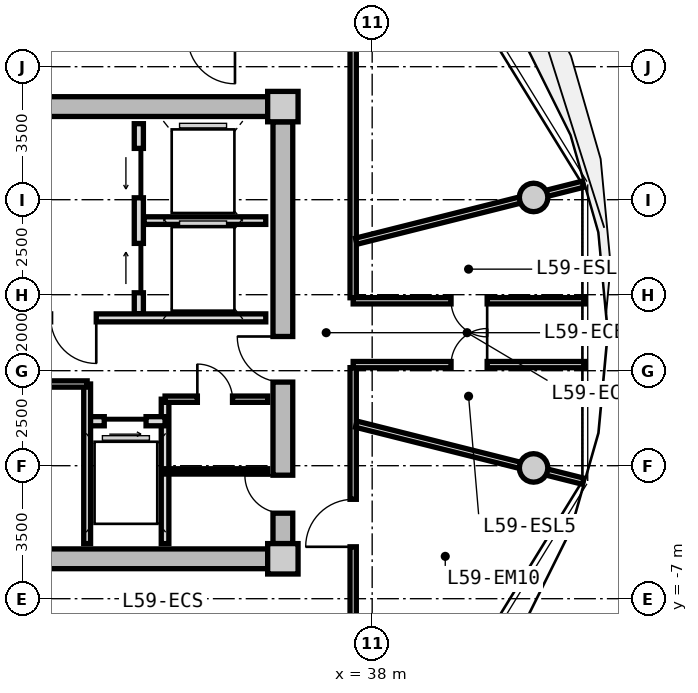
"""IFC4 building model, lengths in metres.
Left out: names, types, materials, properties, quantities, classifications, styles, units other than length and angle.
Written with IfcOpenShell. Run it as: python <this file> out.ifc"""

import sys

from ifc_helpers import new_model, si_unit, direction, frame, frame_2d, origin, origin_2d, place, context, subcontext, project, spatial, rectangle, circle, extrude, source, transform, mapped, element, fill, save


model = new_model("IFC4")
c1 = context("Model", 3, precision=1e-05, world=origin(), true_north=direction((0.0, 1.0)))
c2 = subcontext(c1, "Body", "Model", "MODEL_VIEW")
j1 = project(units=[si_unit("LENGTHUNIT", "METRE"), si_unit("PLANEANGLEUNIT", "RADIAN")], contexts=[c1])
p1 = place(None, origin())
s1 = spatial("IfcSite", under=j1, at=p1, CompositionType="ELEMENT")
p2 = place(p1, origin())
s2 = spatial("IfcBuilding", under=s1, at=p2, CompositionType="ELEMENT")
p3 = place(p2, frame((0.0, 0.0, 190.65)))
s3 = spatial("IfcBuildingStorey", under=s2, at=p3, CompositionType="ELEMENT", Elevation=190.65)
m1 = source(origin(), c2, "Body", "SweptSolid", [
    extrude(rectangle(XDim=0.8, YDim=0.8, at=origin_2d()), origin(), (0.0, 0.0, 1.0), 3.05),
])
for number, where, z_axis, x_axis in (
    (1, (35.65, -5.95, 0.0), (0.0, 0.0, 1.0), (1.0, 0.0, 0.0)),
    (2, (35.65, 5.95, 0.0), (0.0, 0.0, 1.0), (1.0, 0.0, 0.0)),
):
    element("IfcColumn", number, at=place(p3, frame(where, z_axis=z_axis, x_axis=x_axis)), inside=s3, PredefinedType="COLUMN", context=c2, shape_type="MappedRepresentation", body=[
        mapped(m1, transform((0.0, 0.0, 0.0), x_axis=(1.0, 0.0, 0.0), y_axis=(0.0, 1.0, 0.0), z_axis=(0.0, 0.0, 1.0), scale=1.0)),
    ])
m2 = source(origin(), c2, "Body", "SweptSolid", [
    extrude(rectangle(XDim=14.5, YDim=0.52, at=frame_2d((7.25, 0.0))), origin(), (0.0, 0.0, 1.0), 2.81),
])
for number, where, z_axis, x_axis in (
    (3, (20.75, 5.95, 0.0), (0.0, 0.0, 1.0), (1.0, 0.0, 0.0)),
    (4, (35.25, -5.95, 0.0), (0.0, 0.0, 1.0), (-1.0, 0.0, 0.0)),
):
    element("IfcWall", number, at=place(p3, frame(where, z_axis=z_axis, x_axis=x_axis)), inside=s3, PredefinedType="SHEAR", context=c2, shape_type="MappedRepresentation", body=[
        mapped(m2, transform((0.0, 0.0, 0.0), x_axis=(1.0, 0.0, 0.0), y_axis=(0.0, 1.0, 0.0), z_axis=(0.0, 0.0, 1.0), scale=1.0)),
    ])
m3 = source(origin(), c2, "Body", "SweptSolid", [
    extrude(rectangle(XDim=11.1, YDim=0.52, at=frame_2d((5.55, 0.0))), origin(), (0.0, 0.0, 1.0), 2.81),
])
p4 = place(p3, frame((35.65, 5.55, 0.0), z_axis=(0.0, 0.0, 1.0), x_axis=(0.0, -1.0, 0.0)))
e5 = element("IfcWall", 5, at=p4, inside=s3, PredefinedType="SHEAR", context=c2, shape_type="MappedRepresentation", body=[
    mapped(m3, transform((0.0, 0.0, 0.0), x_axis=(1.0, 0.0, 0.0), y_axis=(0.0, 1.0, 0.0), z_axis=(0.0, 0.0, 1.0), scale=1.0)),
])
p5 = place(p4, frame((5.65, 0.0, 0.0)))
e6 = element("IfcOpeningElement", 6, at=p5, cuts=e5, PredefinedType="OPENING", context=c2, shape_type="SweptSolid", body=[
    extrude(rectangle(XDim=1.2, YDim=2.15, at=frame_2d((0.6, 1.075))), frame((0.0, 0.27, 0.0), z_axis=(0.0, -1.0, 0.0), x_axis=(1.0, 0.0, 0.0)), (0.0, 0.0, 1.0), 0.54),
])
p6 = place(p4, frame((9.3, 0.0, 0.0)))
e7 = element("IfcOpeningElement", 7, at=p6, cuts=e5, PredefinedType="OPENING", context=c2, shape_type="SweptSolid", body=[
    extrude(rectangle(XDim=1.0, YDim=2.1, at=frame_2d((0.5, 1.05))), frame((0.0, 0.27, 0.0), z_axis=(0.0, -1.0, 0.0), x_axis=(1.0, 0.0, 0.0)), (0.0, 0.0, 1.0), 0.54),
])
m4 = source(origin(), c2, "Body", "SweptSolid", [
    extrude(circle(Radius=0.375, at=origin_2d()), origin(), (0.0, 0.0, 1.0), 3.47),
])
for number, where, z_axis, x_axis in (
    (8, (42.247, 3.559, -0.42), (0.0, 0.0, 1.0), (1.0, 0.0, 0.0)),
    (9, (42.247, -3.559, -0.42), (0.0, 0.0, 1.0), (1.0, 0.0, 0.0)),
):
    element("IfcColumn", number, at=place(p3, frame(where, z_axis=z_axis, x_axis=x_axis)), inside=s3, PredefinedType="COLUMN", context=c2, shape_type="MappedRepresentation", body=[
        mapped(m4, transform((0.0, 0.0, 0.0), x_axis=(1.0, 0.0, 0.0), y_axis=(0.0, 1.0, 0.0), z_axis=(0.0, 0.0, 1.0), scale=1.0)),
    ])
m5 = source(origin(), c2, "Body", "SweptSolid", [
    extrude(rectangle(XDim=5.0, YDim=0.24, at=frame_2d((2.5, 0.0))), origin(), (0.0, 0.0, 1.0), 2.795),
])
p7 = place(p3, frame((31.86, 0.5, 0.0), z_axis=(0.0, 0.0, 1.0), x_axis=(0.0, 1.0, 0.0)))
e10 = element("IfcWall", 10, at=p7, inside=s3, PredefinedType="PARTITIONING", context=c2, shape_type="MappedRepresentation", body=[
    mapped(m5, transform((0.0, 0.0, 0.0), x_axis=(1.0, 0.0, 0.0), y_axis=(0.0, 1.0, 0.0), z_axis=(0.0, 0.0, 1.0), scale=1.0)),
])
p8 = place(p7, frame((3.05, 0.0, 0.0)))
e11 = element("IfcOpeningElement", 11, at=p8, cuts=e10, PredefinedType="OPENING", context=c2, shape_type="SweptSolid", body=[
    extrude(rectangle(XDim=1.3, YDim=2.2, at=frame_2d((0.65, 1.1))), frame((0.0, 0.13, 0.0), z_axis=(0.0, -1.0, 0.0), x_axis=(1.0, 0.0, 0.0)), (0.0, 0.0, 1.0), 0.26),
])
p9 = place(p7, frame((0.55, 0.0, 0.0)))
e12 = element("IfcOpeningElement", 12, at=p9, cuts=e10, PredefinedType="OPENING", context=c2, shape_type="SweptSolid", body=[
    extrude(rectangle(XDim=1.3, YDim=2.2, at=frame_2d((0.65, 1.1))), frame((0.0, 0.13, 0.0), z_axis=(0.0, -1.0, 0.0), x_axis=(1.0, 0.0, 0.0)), (0.0, 0.0, 1.0), 0.26),
])
m6 = source(origin(), c2, "Body", "SweptSolid", [
    extrude(rectangle(XDim=3.2, YDim=0.2, at=frame_2d((1.6, 0.0))), origin(), (0.0, 0.0, 1.0), 2.795),
])
p10 = place(p3, frame((32.0, 2.95, 0.0), z_axis=(0.0, 0.0, 1.0), x_axis=(1.0, 0.0, 0.0)))
e13 = element("IfcWall", 13, at=p10, inside=s3, PredefinedType="PARTITIONING", context=c2, shape_type="MappedRepresentation", body=[
    mapped(m6, transform((0.0, 0.0, 0.0), x_axis=(1.0, 0.0, 0.0), y_axis=(0.0, 1.0, 0.0), z_axis=(0.0, 0.0, 1.0), scale=1.0)),
])
m7 = source(origin(), c2, "Body", "SweptSolid", [
    extrude(rectangle(XDim=6.66, YDim=0.21, at=frame_2d((3.33, 0.0))), origin(), (0.0, 0.0, 1.0), 2.795),
])
p11 = place(p3, frame((28.54, 0.39, 0.0), z_axis=(0.0, 0.0, 1.0), x_axis=(1.0, 0.0, 0.0)))
e14 = element("IfcWall", 14, at=p11, inside=s3, PredefinedType="PARTITIONING", context=c2, shape_type="MappedRepresentation", body=[
    mapped(m7, transform((0.0, 0.0, 0.0), x_axis=(1.0, 0.0, 0.0), y_axis=(0.0, 1.0, 0.0), z_axis=(0.0, 0.0, 1.0), scale=1.0)),
])
p12 = place(p11, frame((1.0, 0.0, 0.0)))
e15 = element("IfcOpeningElement", 15, at=p12, cuts=e14, PredefinedType="OPENING", context=c2, shape_type="SweptSolid", body=[
    extrude(rectangle(XDim=1.2, YDim=2.15, at=frame_2d((0.6, 1.075))), frame((0.0, 0.115, 0.0), z_axis=(0.0, -1.0, 0.0), x_axis=(1.0, 0.0, 0.0)), (0.0, 0.0, 1.0), 0.23),
])
m8 = source(origin(), c2, "Body", "SweptSolid", [
    extrude(rectangle(XDim=3.8, YDim=0.2, at=frame_2d((1.9, 0.0))), origin(), (0.0, 0.0, 1.0), 2.795),
])
p13 = place(p3, frame((32.55, -5.55, 0.0), z_axis=(0.0, 0.0, 1.0), x_axis=(0.0, 1.0, 0.0)))
e16 = element("IfcWall", 16, at=p13, inside=s3, PredefinedType="PARTITIONING", context=c2, shape_type="MappedRepresentation", body=[
    mapped(m8, transform((0.0, 0.0, 0.0), x_axis=(1.0, 0.0, 0.0), y_axis=(0.0, 1.0, 0.0), z_axis=(0.0, 0.0, 1.0), scale=1.0)),
])
m9 = source(origin(), c2, "Body", "SweptSolid", [
    extrude(rectangle(XDim=2.05, YDim=0.24, at=frame_2d((1.025, 0.0))), origin(), (0.0, 0.0, 1.0), 2.795),
])
p14 = place(p3, frame((30.5, -2.33, 0.0), z_axis=(0.0, 0.0, 1.0), x_axis=(1.0, 0.0, 0.0)))
e17 = element("IfcWall", 17, at=p14, inside=s3, PredefinedType="PARTITIONING", context=c2, shape_type="MappedRepresentation", body=[
    mapped(m9, transform((0.0, 0.0, 0.0), x_axis=(1.0, 0.0, 0.0), y_axis=(0.0, 1.0, 0.0), z_axis=(0.0, 0.0, 1.0), scale=1.0)),
])
p15 = place(p14, frame((0.45, 0.0, 0.0)))
e18 = element("IfcOpeningElement", 18, at=p15, cuts=e17, PredefinedType="OPENING", context=c2, shape_type="SweptSolid", body=[
    extrude(rectangle(XDim=1.1, YDim=2.2, at=frame_2d((0.55, 1.1))), frame((0.0, 0.13, 0.0), z_axis=(0.0, -1.0, 0.0), x_axis=(1.0, 0.0, 0.0)), (0.0, 0.0, 1.0), 0.26),
])
m10 = source(origin(), c2, "Body", "SweptSolid", [
    extrude(rectangle(XDim=4.2, YDim=0.18, at=frame_2d((2.1, 0.0))), origin(), (0.0, 0.0, 1.0), 2.795),
])
p16 = place(p3, frame((30.5, -5.55, 0.0), z_axis=(0.0, 0.0, 1.0), x_axis=(0.0, 1.0, 0.0)))
e19 = element("IfcWall", 19, at=p16, inside=s3, PredefinedType="PARTITIONING", context=c2, shape_type="MappedRepresentation", body=[
    mapped(m10, transform((0.0, 0.0, 0.0), x_axis=(1.0, 0.0, 0.0), y_axis=(0.0, 1.0, 0.0), z_axis=(0.0, 0.0, 1.0), scale=1.0)),
])
m11 = source(origin(), c2, "Body", "SweptSolid", [
    extrude(rectangle(XDim=4.77, YDim=0.165, at=frame_2d((2.385, 0.0))), origin(), (0.0, 0.0, 1.0), 2.795),
])
p17 = place(p3, frame((25.73, -1.35, 0.0), z_axis=(0.0, 0.0, 1.0), x_axis=(1.0, 0.0, 0.0)))
e20 = element("IfcWall", 20, at=p17, inside=s3, PredefinedType="PARTITIONING", context=c2, shape_type="MappedRepresentation", body=[
    mapped(m11, transform((0.0, 0.0, 0.0), x_axis=(1.0, 0.0, 0.0), y_axis=(0.0, 1.0, 0.0), z_axis=(0.0, 0.0, 1.0), scale=1.0)),
])
p18 = place(p17, frame((1.85, 0.0, 0.0)))
e21 = element("IfcOpeningElement", 21, at=p18, cuts=e20, PredefinedType="OPENING", context=c2, shape_type="SweptSolid", body=[
    extrude(rectangle(XDim=1.0, YDim=2.1, at=frame_2d((0.5, 1.05))), frame((0.0, 0.093, 0.0), z_axis=(0.0, -1.0, 0.0), x_axis=(1.0, 0.0, 0.0)), (0.0, 0.0, 1.0), 0.185),
])
m12 = source(origin(), c2, "Body", "SweptSolid", [
    extrude(rectangle(XDim=2.7, YDim=0.165, at=frame_2d((1.35, 0.0))), origin(), (0.0, 0.0, 1.0), 2.795),
])
p19 = place(p3, frame((32.55, -1.75, 0.0), z_axis=(0.0, 0.0, 1.0), x_axis=(1.0, 0.0, 0.0)))
e22 = element("IfcWall", 22, at=p19, inside=s3, PredefinedType="PARTITIONING", context=c2, shape_type="MappedRepresentation", body=[
    mapped(m12, transform((0.0, 0.0, 0.0), x_axis=(1.0, 0.0, 0.0), y_axis=(0.0, 1.0, 0.0), z_axis=(0.0, 0.0, 1.0), scale=1.0)),
])
p20 = place(p19, frame((0.85, 0.0, 0.0)))
e23 = element("IfcOpeningElement", 23, at=p20, cuts=e22, PredefinedType="OPENING", context=c2, shape_type="SweptSolid", body=[
    extrude(rectangle(XDim=0.925, YDim=2.1, at=frame_2d((0.462, 1.05))), frame((0.0, 0.093, 0.0), z_axis=(0.0, -1.0, 0.0), x_axis=(1.0, 0.0, 0.0)), (0.0, 0.0, 1.0), 0.185),
])
m13 = source(origin(), c2, "Body", "SweptSolid", [
    extrude(rectangle(XDim=2.7, YDim=0.14, at=frame_2d((1.35, 0.0))), origin(), (0.0, 0.0, 1.0), 2.795),
])
p21 = place(p3, frame((32.55, -3.65, 0.0), z_axis=(0.0, 0.0, 1.0), x_axis=(1.0, 0.0, 0.0)))
e24 = element("IfcWall", 24, at=p21, inside=s3, PredefinedType="PARTITIONING", context=c2, shape_type="MappedRepresentation", body=[
    mapped(m13, transform((0.0, 0.0, 0.0), x_axis=(1.0, 0.0, 0.0), y_axis=(0.0, 1.0, 0.0), z_axis=(0.0, 0.0, 1.0), scale=1.0)),
])
m14 = source(origin(), c2, "Body", "SweptSolid", [
    extrude(rectangle(XDim=6.88, YDim=0.165, at=frame_2d((3.44, 0.0))), origin(), (0.0, 0.0, 1.0), 2.795),
])
p22 = place(p3, frame((37.5, 7.8, 0.0), z_axis=(0.0, 0.0, 1.0), x_axis=(0.0, -1.0, 0.0)))
e25 = element("IfcWall", 25, at=p22, inside=s3, PredefinedType="PARTITIONING", context=c2, shape_type="MappedRepresentation", body=[
    mapped(m14, transform((0.0, 0.0, 0.0), x_axis=(1.0, 0.0, 0.0), y_axis=(0.0, 1.0, 0.0), z_axis=(0.0, 0.0, 1.0), scale=1.0)),
])
p23 = place(p3, frame((37.5, -0.92, 0.0), z_axis=(0.0, 0.0, 1.0), x_axis=(0.0, -1.0, 0.0)))
e26 = element("IfcWall", 26, at=p23, inside=s3, PredefinedType="PARTITIONING", context=c2, shape_type="MappedRepresentation", body=[
    mapped(m14, transform((0.0, 0.0, 0.0), x_axis=(1.0, 0.0, 0.0), y_axis=(0.0, 1.0, 0.0), z_axis=(0.0, 0.0, 1.0), scale=1.0)),
])
p24 = place(p23, frame((3.464, 0.0, 0.0)))
e27 = element("IfcOpeningElement", 27, at=p24, cuts=e26, PredefinedType="OPENING", context=c2, shape_type="SweptSolid", body=[
    extrude(rectangle(XDim=1.25, YDim=2.2, at=frame_2d((0.625, 1.1))), frame((0.0, 0.093, 0.0), z_axis=(0.0, -1.0, 0.0), x_axis=(1.0, 0.0, 0.0)), (0.0, 0.0, 1.0), 0.185),
])
m15 = source(origin(), c2, "Body", "SweptSolid", [
    extrude(rectangle(XDim=6.157, YDim=0.165, at=frame_2d((3.079, 0.0))), origin(), (0.0, 0.0, 1.0), 2.395),
])
for number, where, z_axis, x_axis in (
    (28, (37.58, -2.407, 0.0), (0.0, 0.0, 1.0), (0.97, -0.244, 0.0)),
    (29, (37.58, 2.407, 0.0), (0.0, 0.0, 1.0), (0.97, 0.244, 0.0)),
):
    element("IfcWall", number, at=place(p3, frame(where, z_axis=z_axis, x_axis=x_axis)), inside=s3, PredefinedType="PARTITIONING", context=c2, shape_type="MappedRepresentation", body=[
        mapped(m15, transform((0.0, 0.0, 0.0), x_axis=(1.0, 0.0, 0.0), y_axis=(0.0, 1.0, 0.0), z_axis=(0.0, 0.0, 1.0), scale=1.0)),
    ])
m16 = source(origin(), c2, "Body", "SweptSolid", [
    extrude(rectangle(XDim=6.101, YDim=0.165, at=frame_2d((3.051, 0.0))), origin(), (0.0, 0.0, 1.0), 2.795),
])
p25 = place(p3, frame((37.5, 0.84, 0.0), z_axis=(0.0, 0.0, 1.0), x_axis=(1.0, 0.0, 0.0)))
e30 = element("IfcWall", 30, at=p25, inside=s3, PredefinedType="PARTITIONING", context=c2, shape_type="MappedRepresentation", body=[
    mapped(m16, transform((0.0, 0.0, 0.0), x_axis=(1.0, 0.0, 0.0), y_axis=(0.0, 1.0, 0.0), z_axis=(0.0, 0.0, 1.0), scale=1.0)),
])
p26 = place(p25, frame((2.576, 0.0, 0.0)))
e31 = element("IfcOpeningElement", 31, at=p26, cuts=e30, PredefinedType="OPENING", context=c2, shape_type="SweptSolid", body=[
    extrude(rectangle(XDim=0.95, YDim=2.1, at=frame_2d((0.475, 1.05))), frame((0.0, 0.093, 0.0), z_axis=(0.0, -1.0, 0.0), x_axis=(1.0, 0.0, 0.0)), (0.0, 0.0, 1.0), 0.185),
])
p27 = place(p3, frame((43.601, -0.84, 0.0), z_axis=(0.0, 0.0, 1.0), x_axis=(-1.0, 0.0, 0.0)))
e32 = element("IfcWall", 32, at=p27, inside=s3, PredefinedType="PARTITIONING", context=c2, shape_type="MappedRepresentation", body=[
    mapped(m16, transform((0.0, 0.0, 0.0), x_axis=(1.0, 0.0, 0.0), y_axis=(0.0, 1.0, 0.0), z_axis=(0.0, 0.0, 1.0), scale=1.0)),
])
p28 = place(p27, frame((2.576, 0.0, 0.0)))
e33 = element("IfcOpeningElement", 33, at=p28, cuts=e32, PredefinedType="OPENING", context=c2, shape_type="SweptSolid", body=[
    extrude(rectangle(XDim=0.95, YDim=2.1, at=frame_2d((0.475, 1.05))), frame((0.0, 0.093, 0.0), z_axis=(0.0, -1.0, 0.0), x_axis=(1.0, 0.0, 0.0)), (0.0, 0.0, 1.0), 0.185),
])
m17 = source(origin(), c2, "Body", "SweptSolid", [
    extrude(rectangle(XDim=1.3, YDim=2.2, at=frame_2d((0.65, 1.1))), frame((0.0, 0.025, 0.0), z_axis=(0.0, -1.0, 0.0), x_axis=(1.0, 0.0, 0.0)), (0.0, 0.0, 1.0), 0.05),
])
p29 = place(p8, origin())
e34 = element("IfcDoor", 34, at=p29, inside=s3, OperationType="SLIDING_TO_LEFT", PredefinedType="DOOR", context=c2, shape_type="MappedRepresentation", body=[
    mapped(m17, transform((0.0, 0.0, 0.0), x_axis=(1.0, 0.0, 0.0), y_axis=(0.0, 1.0, 0.0), z_axis=(0.0, 0.0, 1.0), scale=1.0)),
])
fill(e11, e34)
p30 = place(p9, origin())
e35 = element("IfcDoor", 35, at=p30, inside=s3, OperationType="SLIDING_TO_RIGHT", PredefinedType="DOOR", context=c2, shape_type="MappedRepresentation", body=[
    mapped(m17, transform((0.0, 0.0, 0.0), x_axis=(1.0, 0.0, 0.0), y_axis=(0.0, 1.0, 0.0), z_axis=(0.0, 0.0, 1.0), scale=1.0)),
])
fill(e12, e35)
m18 = source(origin(), c2, "Body", "SweptSolid", [
    extrude(rectangle(XDim=1.2, YDim=2.15, at=frame_2d((0.6, 1.075))), frame((0.0, 0.025, 0.0), z_axis=(0.0, -1.0, 0.0), x_axis=(1.0, 0.0, 0.0)), (0.0, 0.0, 1.0), 0.05),
])
p31 = place(p12, frame((1.2, 0.0, 0.0), z_axis=(0.0, 0.0, 1.0), x_axis=(-1.0, 0.0, 0.0)))
e36 = element("IfcDoor", 36, at=p31, inside=s3, OperationType="SINGLE_SWING_LEFT", PredefinedType="DOOR", context=c2, shape_type="MappedRepresentation", body=[
    mapped(m18, transform((0.0, 0.0, 0.0), x_axis=(1.0, 0.0, 0.0), y_axis=(0.0, 1.0, 0.0), z_axis=(0.0, 0.0, 1.0), scale=1.0)),
])
fill(e15, e36)
p32 = place(p5, frame((1.2, 0.0, 0.0), z_axis=(0.0, 0.0, 1.0), x_axis=(-1.0, 0.0, 0.0)))
e37 = element("IfcDoor", 37, at=p32, inside=s3, OperationType="SINGLE_SWING_RIGHT", PredefinedType="DOOR", context=c2, shape_type="MappedRepresentation", body=[
    mapped(m18, transform((0.0, 0.0, 0.0), x_axis=(1.0, 0.0, 0.0), y_axis=(0.0, 1.0, 0.0), z_axis=(0.0, 0.0, 1.0), scale=1.0)),
])
fill(e6, e37)
m19 = source(origin(), c2, "Body", "SweptSolid", [
    extrude(rectangle(XDim=1.1, YDim=2.2, at=frame_2d((0.55, 1.1))), frame((0.0, 0.025, 0.0), z_axis=(0.0, -1.0, 0.0), x_axis=(1.0, 0.0, 0.0)), (0.0, 0.0, 1.0), 0.05),
])
p33 = place(p15, frame((1.1, 0.0, 0.0), z_axis=(0.0, 0.0, 1.0), x_axis=(-1.0, 0.0, 0.0)))
e38 = element("IfcDoor", 38, at=p33, inside=s3, OperationType="SLIDING_TO_RIGHT", PredefinedType="DOOR", context=c2, shape_type="MappedRepresentation", body=[
    mapped(m19, transform((0.0, 0.0, 0.0), x_axis=(1.0, 0.0, 0.0), y_axis=(0.0, 1.0, 0.0), z_axis=(0.0, 0.0, 1.0), scale=1.0)),
])
fill(e18, e38)
m20 = source(origin(), c2, "Body", "SweptSolid", [
    extrude(rectangle(XDim=0.925, YDim=2.1, at=frame_2d((0.462, 1.05))), frame((0.0, 0.025, 0.0), z_axis=(0.0, -1.0, 0.0), x_axis=(1.0, 0.0, 0.0)), (0.0, 0.0, 1.0), 0.05),
])
p34 = place(p20, origin())
e39 = element("IfcDoor", 39, at=p34, inside=s3, OperationType="SINGLE_SWING_LEFT", PredefinedType="DOOR", context=c2, shape_type="MappedRepresentation", body=[
    mapped(m20, transform((0.0, 0.0, 0.0), x_axis=(1.0, 0.0, 0.0), y_axis=(0.0, 1.0, 0.0), z_axis=(0.0, 0.0, 1.0), scale=1.0)),
])
fill(e23, e39)
m21 = source(origin(), c2, "Body", "SweptSolid", [
    extrude(rectangle(XDim=1.0, YDim=2.1, at=frame_2d((0.5, 1.05))), frame((0.0, 0.025, 0.0), z_axis=(0.0, -1.0, 0.0), x_axis=(1.0, 0.0, 0.0)), (0.0, 0.0, 1.0), 0.05),
])
p35 = place(p6, frame((1.0, 0.0, 0.0), z_axis=(0.0, 0.0, 1.0), x_axis=(-1.0, 0.0, 0.0)))
e40 = element("IfcDoor", 40, at=p35, inside=s3, OperationType="SINGLE_SWING_RIGHT", PredefinedType="DOOR", context=c2, shape_type="MappedRepresentation", body=[
    mapped(m21, transform((0.0, 0.0, 0.0), x_axis=(1.0, 0.0, 0.0), y_axis=(0.0, 1.0, 0.0), z_axis=(0.0, 0.0, 1.0), scale=1.0)),
])
fill(e7, e40)
m22 = source(origin(), c2, "Body", "SweptSolid", [
    extrude(rectangle(XDim=0.95, YDim=2.1, at=frame_2d((0.475, 1.05))), frame((0.0, 0.025, 0.0), z_axis=(0.0, -1.0, 0.0), x_axis=(1.0, 0.0, 0.0)), (0.0, 0.0, 1.0), 0.05),
])
p36 = place(p28, frame((0.95, 0.0, 0.0), z_axis=(0.0, 0.0, 1.0), x_axis=(-1.0, 0.0, 0.0)))
e41 = element("IfcDoor", 41, at=p36, inside=s3, OperationType="SINGLE_SWING_RIGHT", PredefinedType="DOOR", context=c2, shape_type="MappedRepresentation", body=[
    mapped(m22, transform((0.0, 0.0, 0.0), x_axis=(1.0, 0.0, 0.0), y_axis=(0.0, 1.0, 0.0), z_axis=(0.0, 0.0, 1.0), scale=1.0)),
])
fill(e33, e41)
p37 = place(p26, frame((0.95, 0.0, 0.0), z_axis=(0.0, 0.0, 1.0), x_axis=(-1.0, 0.0, 0.0)))
e42 = element("IfcDoor", 42, at=p37, inside=s3, OperationType="SINGLE_SWING_LEFT", PredefinedType="DOOR", context=c2, shape_type="MappedRepresentation", body=[
    mapped(m22, transform((0.0, 0.0, 0.0), x_axis=(1.0, 0.0, 0.0), y_axis=(0.0, 1.0, 0.0), z_axis=(0.0, 0.0, 1.0), scale=1.0)),
])
fill(e31, e42)
m23 = source(origin(), c2, "Body", "SweptSolid", [
    extrude(rectangle(XDim=1.25, YDim=2.2, at=frame_2d((0.625, 1.1))), frame((0.0, 0.025, 0.0), z_axis=(0.0, -1.0, 0.0), x_axis=(1.0, 0.0, 0.0)), (0.0, 0.0, 1.0), 0.05),
])
p38 = place(p24, frame((1.25, 0.0, 0.0), z_axis=(0.0, 0.0, 1.0), x_axis=(-1.0, 0.0, 0.0)))
e43 = element("IfcDoor", 43, at=p38, inside=s3, OperationType="SINGLE_SWING_LEFT", PredefinedType="DOOR", context=c2, shape_type="MappedRepresentation", body=[
    mapped(m23, transform((0.0, 0.0, 0.0), x_axis=(1.0, 0.0, 0.0), y_axis=(0.0, 1.0, 0.0), z_axis=(0.0, 0.0, 1.0), scale=1.0)),
])
fill(e27, e43)
save(model, sys.argv[1])
